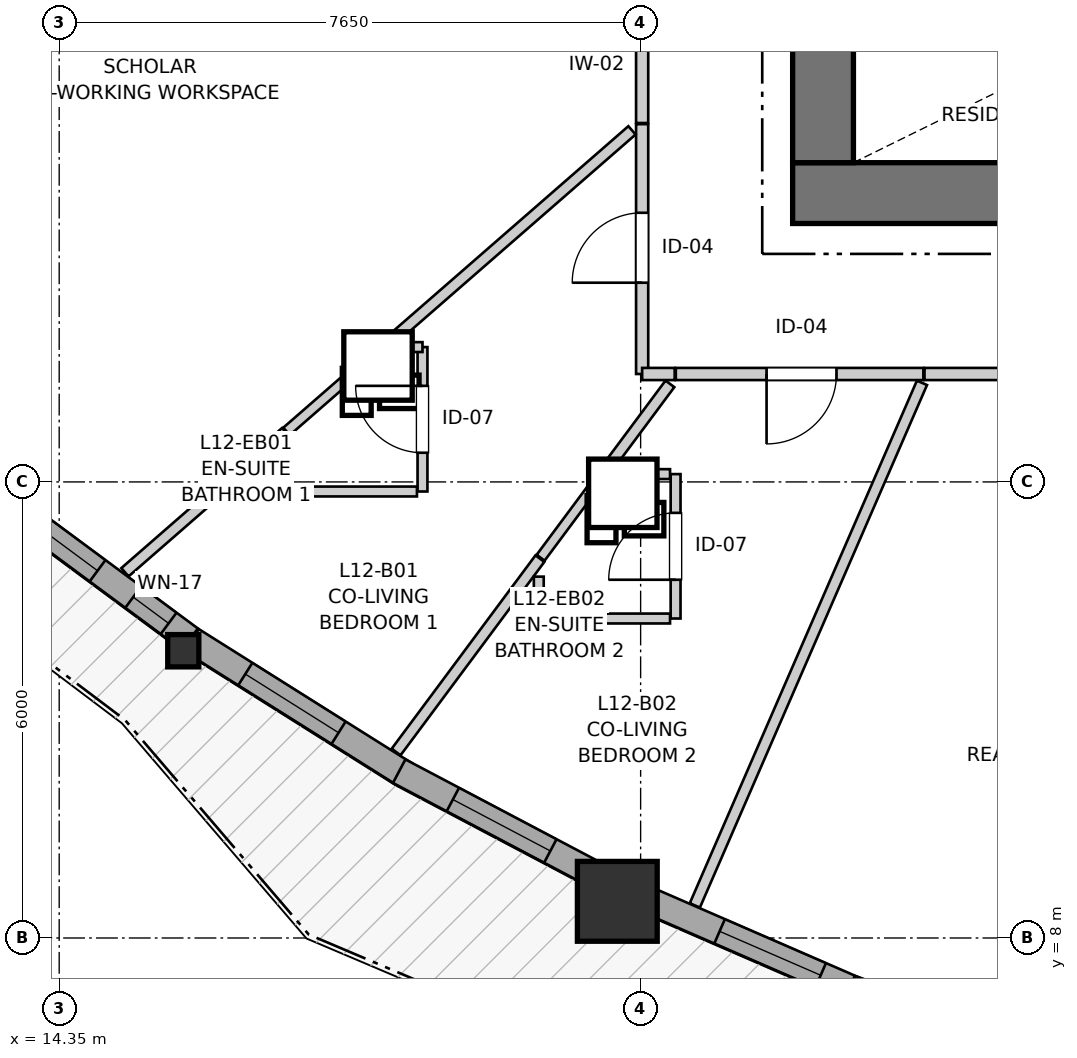
"""IFC4 building model, lengths in metres.
Left out: names, types, materials, properties, quantities, classifications, styles, units other than length and angle.
Written with IfcOpenShell. Run it as: python <this file> out.ifc"""

import sys

from ifc_helpers import new_model, si_unit, direction, frame, frame_2d, origin, origin_2d, place, context, subcontext, project, spatial, rectangle, i_section, extrude, source, transform, mapped, element, fill, save


model = new_model("IFC4")
c1 = context("Model", 3, precision=1e-05, world=origin(), true_north=direction((0.0, 1.0)))
c2 = subcontext(c1, "Body", "Model", "MODEL_VIEW")
j1 = project(units=[si_unit("LENGTHUNIT", "METRE"), si_unit("PLANEANGLEUNIT", "RADIAN")], contexts=[c1])
p1 = place(None, origin())
s1 = spatial("IfcSite", under=j1, at=p1, CompositionType="ELEMENT")
p2 = place(p1, origin())
s2 = spatial("IfcBuilding", under=s1, at=p2, CompositionType="ELEMENT")
p3 = place(p2, frame((0.0, 0.0, 43.0)))
s3 = spatial("IfcBuildingStorey", under=s2, at=p3, CompositionType="ELEMENT", Elevation=43.0)
p4 = place(p3, frame((24.0, 17.8, 0.0), z_axis=(0.0, 0.0, 1.0), x_axis=(1.0, 0.0, 0.0)))
e1 = element("IfcWall", 1, at=p4, inside=s3, PredefinedType="SHEAR", context=c2, shape_type="SweptSolid", body=[
    extrude(rectangle(XDim=12.7, YDim=0.8, at=frame_2d((6.35, 0.0))), origin(), (0.0, 0.0, 1.0), 2.94),
])
p5 = place(p3, frame((24.4, 33.8, 0.0), z_axis=(0.0, 0.0, 1.0), x_axis=(0.0, -1.0, 0.0)))
e2 = element("IfcWall", 2, at=p5, inside=s3, PredefinedType="SHEAR", context=c2, shape_type="SweptSolid", body=[
    extrude(rectangle(XDim=15.6, YDim=0.8, at=frame_2d((7.8, 0.0))), origin(), (0.0, 0.0, 1.0), 2.94),
])
p6 = place(p5, frame((7.05, 0.0, 0.0)))
e3 = element("IfcOpeningElement", 3, at=p6, cuts=e2, PredefinedType="OPENING", context=c2, shape_type="SweptSolid", body=[
    extrude(rectangle(XDim=1.5, YDim=2.15, at=frame_2d((0.75, 1.075))), frame((0.0, 0.41, 0.0), z_axis=(0.0, -1.0, 0.0), x_axis=(1.0, 0.0, 0.0)), (0.0, 0.0, 1.0), 0.82),
])
p7 = place(p5, frame((3.52, 0.0, 0.0)))
e4 = element("IfcOpeningElement", 4, at=p7, cuts=e2, PredefinedType="OPENING", context=c2, shape_type="SweptSolid", body=[
    extrude(rectangle(XDim=0.86, YDim=2.05, at=frame_2d((0.43, 1.025))), frame((0.0, 0.41, 0.0), z_axis=(0.0, -1.0, 0.0), x_axis=(1.0, 0.0, 0.0)), (0.0, 0.0, 1.0), 0.82),
])
p8 = place(p5, frame((11.22, 0.0, 0.0)))
e5 = element("IfcOpeningElement", 5, at=p8, cuts=e2, PredefinedType="OPENING", context=c2, shape_type="SweptSolid", body=[
    extrude(rectangle(XDim=0.86, YDim=2.05, at=frame_2d((0.43, 1.025))), frame((0.0, 0.41, 0.0), z_axis=(0.0, -1.0, 0.0), x_axis=(1.0, 0.0, 0.0)), (0.0, 0.0, 1.0), 0.82),
])
m1 = source(origin(), c2, "Body", "SweptSolid", [
    extrude(i_section(OverallWidth=0.409, OverallDepth=0.425, WebThickness=0.03, FlangeThickness=0.048, FilletRadius=0.015, at=origin_2d()), origin(), (0.0, 0.0, 1.0), 2.94),
])
p9 = place(p3, frame((15.983, 11.779, 0.0), z_axis=(0.0, 0.0, 1.0), x_axis=(1.0, 0.0, 0.0)))
e6 = element("IfcColumn", 6, at=p9, inside=s3, PredefinedType="PILASTER", context=c2, shape_type="MappedRepresentation", body=[
    mapped(m1, transform((0.0, 0.0, 0.0), x_axis=(1.0, 0.0, 0.0), y_axis=(0.0, 1.0, 0.0), z_axis=(0.0, 0.0, 1.0), scale=1.0)),
])
m2 = source(origin(), c2, "Body", "SweptSolid", [
    extrude(rectangle(XDim=1.05, YDim=1.05, at=origin_2d()), origin(), (0.0, 0.0, 1.0), 2.94),
])
p10 = place(p3, frame((21.693, 8.482, 0.0), z_axis=(0.0, 0.0, 1.0), x_axis=(1.0, 0.0, 0.0)))
e7 = element("IfcColumn", 7, at=p10, inside=s3, PredefinedType="COLUMN", context=c2, shape_type="MappedRepresentation", body=[
    mapped(m2, transform((0.0, 0.0, 0.0), x_axis=(1.0, 0.0, 0.0), y_axis=(0.0, 1.0, 0.0), z_axis=(0.0, 0.0, 1.0), scale=1.0)),
])
p11 = place(p3, frame((13.389, 13.917, 0.0), z_axis=(0.0, 0.0, 1.0), x_axis=(0.803777512245, -0.594930004966, 0.0)))
e8 = element("IfcWall", 8, at=p11, inside=s3, PredefinedType="SOLIDWALL", context=c2, shape_type="SweptSolid", body=[
    extrude(rectangle(XDim=3.336, YDim=0.35, at=frame_2d((1.668, 0.0))), origin(), (0.0, 0.0, 1.0), 2.42),
])
p12 = place(p11, frame((0.374, 0.0, 0.82)))
e9 = element("IfcOpeningElement", 9, at=p12, cuts=e8, PredefinedType="OPENING", context=c2, shape_type="SweptSolid", body=[
    extrude(rectangle(XDim=1.45, YDim=1.25, at=frame_2d((0.725, 0.625))), frame((0.0, 0.185, 0.0), z_axis=(0.0, -1.0, 0.0), x_axis=(1.0, 0.0, 0.0)), (0.0, 0.0, 1.0), 0.37),
])
p13 = place(p11, frame((2.407, 0.0, 0.82)))
e10 = element("IfcOpeningElement", 10, at=p13, cuts=e8, PredefinedType="OPENING", context=c2, shape_type="SweptSolid", body=[
    extrude(rectangle(XDim=0.58, YDim=1.35, at=frame_2d((0.29, 0.675))), frame((0.0, 0.185, 0.0), z_axis=(0.0, -1.0, 0.0), x_axis=(1.0, 0.0, 0.0)), (0.0, 0.0, 1.0), 0.37),
])
p14 = place(p3, frame((16.093, 11.917, 0.0), z_axis=(0.0, 0.0, 1.0), x_axis=(0.846444167315, -0.532477484612, 0.0)))
e11 = element("IfcWall", 11, at=p14, inside=s3, PredefinedType="SOLIDWALL", context=c2, shape_type="SweptSolid", body=[
    extrude(rectangle(XDim=3.317, YDim=0.35, at=frame_2d((1.659, 0.0))), origin(), (0.0, 0.0, 1.0), 2.42),
])
p15 = place(p14, frame((0.834, 0.0, 0.82)))
e12 = element("IfcOpeningElement", 12, at=p15, cuts=e11, PredefinedType="OPENING", context=c2, shape_type="SweptSolid", body=[
    extrude(rectangle(XDim=1.45, YDim=1.25, at=frame_2d((0.725, 0.625))), frame((0.0, 0.185, 0.0), z_axis=(0.0, -1.0, 0.0), x_axis=(1.0, 0.0, 0.0)), (0.0, 0.0, 1.0), 0.37),
])
p16 = place(p3, frame((18.823, 10.195, 0.0), z_axis=(0.0, 0.0, 1.0), x_axis=(0.884422538795, -0.466687018108, 0.0)))
e13 = element("IfcWall", 13, at=p16, inside=s3, PredefinedType="SOLIDWALL", context=c2, shape_type="SweptSolid", body=[
    extrude(rectangle(XDim=3.037, YDim=0.35, at=frame_2d((1.519, 0.0))), origin(), (0.0, 0.0, 1.0), 2.42),
])
p17 = place(p16, frame((0.799, 0.0, 0.82)))
e14 = element("IfcOpeningElement", 14, at=p17, cuts=e13, PredefinedType="OPENING", context=c2, shape_type="SweptSolid", body=[
    extrude(rectangle(XDim=1.45, YDim=1.25, at=frame_2d((0.725, 0.625))), frame((0.0, 0.185, 0.0), z_axis=(0.0, -1.0, 0.0), x_axis=(1.0, 0.0, 0.0)), (0.0, 0.0, 1.0), 0.37),
])
p18 = place(p3, frame((22.038, 8.523, 0.0), z_axis=(0.0, 0.0, 1.0), x_axis=(0.91704973522, -0.398772846535, 0.0)))
e15 = element("IfcWall", 15, at=p18, inside=s3, PredefinedType="SOLIDWALL", context=c2, shape_type="SweptSolid", body=[
    extrude(rectangle(XDim=3.056, YDim=0.35, at=frame_2d((1.528, 0.0))), origin(), (0.0, 0.0, 1.0), 2.42),
])
p19 = place(p18, frame((1.092, 0.0, 0.82)))
e16 = element("IfcOpeningElement", 16, at=p19, cuts=e15, PredefinedType="OPENING", context=c2, shape_type="SweptSolid", body=[
    extrude(rectangle(XDim=1.45, YDim=1.25, at=frame_2d((0.725, 0.625))), frame((0.0, 0.185, 0.0), z_axis=(0.0, -1.0, 0.0), x_axis=(1.0, 0.0, 0.0)), (0.0, 0.0, 1.0), 0.37),
])
p20 = place(p3, frame((24.758, 7.337, 0.0), z_axis=(0.0, 0.0, 1.0), x_axis=(0.944146789085, -0.329525174547, 0.0)))
e17 = element("IfcWall", 17, at=p20, inside=s3, PredefinedType="SOLIDWALL", context=c2, shape_type="SweptSolid", body=[
    extrude(rectangle(XDim=3.374, YDim=0.35, at=frame_2d((1.687, 0.0))), origin(), (0.0, 0.0, 1.0), 2.42),
])
p21 = place(p20, frame((0.647, 0.0, 0.82)))
e18 = element("IfcOpeningElement", 18, at=p21, cuts=e17, PredefinedType="OPENING", context=c2, shape_type="SweptSolid", body=[
    extrude(rectangle(XDim=2.1, YDim=1.4, at=frame_2d((1.05, 0.7))), frame((0.0, 0.185, 0.0), z_axis=(0.0, -1.0, 0.0), x_axis=(1.0, 0.0, 0.0)), (0.0, 0.0, 1.0), 0.37),
])
p22 = place(p3, frame((22.02, 18.722, 0.0), z_axis=(0.0, 0.0, 1.0), x_axis=(0.0, 1.0, 0.0)))
e19 = element("IfcWall", 19, at=p22, inside=s3, PredefinedType="PARTITIONING", context=c2, shape_type="SweptSolid", body=[
    extrude(rectangle(XDim=5.428, YDim=0.16, at=frame_2d((2.714, 0.0))), origin(), (0.0, 0.0, 1.0), 2.94),
])
p23 = place(p22, frame((1.996, 0.0, 0.0)))
e20 = element("IfcOpeningElement", 20, at=p23, cuts=e19, PredefinedType="OPENING", context=c2, shape_type="SweptSolid", body=[
    extrude(rectangle(XDim=0.96, YDim=2.1, at=frame_2d((0.48, 1.05))), frame((0.0, 0.09, 0.0), z_axis=(0.0, -1.0, 0.0), x_axis=(1.0, 0.0, 0.0)), (0.0, 0.0, 1.0), 0.18),
])
p24 = place(p3, frame((30.849, 15.42, 0.0), z_axis=(0.0, 0.0, 1.0), x_axis=(-1.0, 0.0, 0.0)))
e21 = element("IfcWall", 21, at=p24, inside=s3, PredefinedType="PARTITIONING", context=c2, shape_type="SweptSolid", body=[
    extrude(rectangle(XDim=5.114, YDim=0.16, at=frame_2d((2.557, 0.0))), origin(), (0.0, 0.0, 1.0), 2.94),
])
p25 = place(p24, frame((2.076, 0.0, 0.0)))
e22 = element("IfcOpeningElement", 22, at=p25, cuts=e21, PredefinedType="OPENING", context=c2, shape_type="SweptSolid", body=[
    extrude(rectangle(XDim=0.96, YDim=2.1, at=frame_2d((0.48, 1.05))), frame((0.0, 0.09, 0.0), z_axis=(0.0, -1.0, 0.0), x_axis=(1.0, 0.0, 0.0)), (0.0, 0.0, 1.0), 0.18),
])
p26 = place(p3, frame((22.02, 15.42, 0.0), z_axis=(0.0, 0.0, 1.0), x_axis=(0.0, 1.0, 0.0)))
e23 = element("IfcWall", 23, at=p26, inside=s3, PredefinedType="PARTITIONING", context=c2, shape_type="SweptSolid", body=[
    extrude(rectangle(XDim=3.287, YDim=0.16, at=frame_2d((1.644, 0.0))), origin(), (0.0, 0.0, 1.0), 2.94),
])
p27 = place(p26, frame((1.201, 0.0, 0.0)))
e24 = element("IfcOpeningElement", 24, at=p27, cuts=e23, PredefinedType="OPENING", context=c2, shape_type="SweptSolid", body=[
    extrude(rectangle(XDim=0.92, YDim=2.1, at=frame_2d((0.46, 1.05))), frame((0.0, 0.09, 0.0), z_axis=(0.0, -1.0, 0.0), x_axis=(1.0, 0.0, 0.0)), (0.0, 0.0, 1.0), 0.18),
])
p28 = place(p3, frame((25.72, 15.42, 0.0), z_axis=(0.0, 0.0, 1.0), x_axis=(-1.0, 0.0, 0.0)))
e25 = element("IfcWall", 25, at=p28, inside=s3, PredefinedType="PARTITIONING", context=c2, shape_type="SweptSolid", body=[
    extrude(rectangle(XDim=3.257, YDim=0.16, at=frame_2d((1.628, 0.0))), origin(), (0.0, 0.0, 1.0), 2.94),
])
p29 = place(p28, frame((1.143, 0.0, 0.0)))
e26 = element("IfcOpeningElement", 26, at=p29, cuts=e25, PredefinedType="OPENING", context=c2, shape_type="SweptSolid", body=[
    extrude(rectangle(XDim=0.92, YDim=2.1, at=frame_2d((0.46, 1.05))), frame((0.0, 0.09, 0.0), z_axis=(0.0, -1.0, 0.0), x_axis=(1.0, 0.0, 0.0)), (0.0, 0.0, 1.0), 0.18),
])
p30 = place(p3, frame((22.46, 12.203, 0.0), z_axis=(0.0, 0.0, 1.0), x_axis=(0.0, 1.0, 0.0)))
e27 = element("IfcWall", 27, at=p30, inside=s3, PredefinedType="PARTITIONING", context=c2, shape_type="SweptSolid", body=[
    extrude(rectangle(XDim=1.9, YDim=0.13, at=frame_2d((0.95, 0.0))), origin(), (0.0, 0.0, 1.0), 2.94),
])
p31 = place(p30, frame((0.51, 0.0, 0.0)))
e28 = element("IfcOpeningElement", 28, at=p31, cuts=e27, PredefinedType="OPENING", context=c2, shape_type="SweptSolid", body=[
    extrude(rectangle(XDim=0.88, YDim=2.05, at=frame_2d((0.44, 1.025))), frame((0.0, 0.075, 0.0), z_axis=(0.0, -1.0, 0.0), x_axis=(1.0, 0.0, 0.0)), (0.0, 0.0, 1.0), 0.15),
])
p32 = place(p3, frame((19.13, 13.874, 0.0), z_axis=(0.0, 0.0, 1.0), x_axis=(0.0, 1.0, 0.0)))
e29 = element("IfcWall", 29, at=p32, inside=s3, PredefinedType="PARTITIONING", context=c2, shape_type="SweptSolid", body=[
    extrude(rectangle(XDim=1.9, YDim=0.13, at=frame_2d((0.95, 0.0))), origin(), (0.0, 0.0, 1.0), 2.94),
])
p33 = place(p32, frame((0.51, 0.0, 0.0)))
e30 = element("IfcOpeningElement", 30, at=p33, cuts=e29, PredefinedType="OPENING", context=c2, shape_type="SweptSolid", body=[
    extrude(rectangle(XDim=0.88, YDim=2.05, at=frame_2d((0.44, 1.025))), frame((0.0, 0.075, 0.0), z_axis=(0.0, -1.0, 0.0), x_axis=(1.0, 0.0, 0.0)), (0.0, 0.0, 1.0), 0.15),
])
p34 = place(p3, frame((22.713, 8.429, 0.0), z_axis=(0.0, 0.0, 1.0), x_axis=(0.398615352261, 0.917118204454, 0.0)))
e31 = element("IfcWall", 31, at=p34, inside=s3, PredefinedType="PARTITIONING", context=c2, shape_type="SweptSolid", body=[
    extrude(rectangle(XDim=7.496, YDim=0.145, at=frame_2d((3.748, 0.0))), origin(), (0.0, 0.0, 1.0), 2.94),
])
p35 = place(p3, frame((18.614, 15.774, 0.0), z_axis=(0.0, 0.0, 1.0), x_axis=(0.753902736672, 0.656986045239, 0.0)))
e32 = element("IfcWall", 32, at=p35, inside=s3, PredefinedType="PARTITIONING", context=c2, shape_type="SweptSolid", body=[
    extrude(rectangle(XDim=4.34, YDim=0.145, at=frame_2d((2.17, 0.0))), origin(), (0.0, 0.0, 1.0), 2.94),
])
p36 = place(p3, frame((18.783, 10.447, 0.0), z_axis=(0.0, 0.0, 1.0), x_axis=(0.596791765516, 0.80239615441, 0.0)))
e33 = element("IfcWall", 33, at=p36, inside=s3, PredefinedType="PARTITIONING", context=c2, shape_type="SweptSolid", body=[
    extrude(rectangle(XDim=3.17, YDim=0.145, at=frame_2d((1.585, 0.0))), origin(), (0.0, 0.0, 1.0), 2.94),
])
p37 = place(p3, frame((15.215, 12.812, 0.0), z_axis=(0.0, 0.0, 1.0), x_axis=(0.753874404049, 0.657018555993, 0.0)))
e34 = element("IfcWall", 34, at=p37, inside=s3, PredefinedType="PARTITIONING", context=c2, shape_type="SweptSolid", body=[
    extrude(rectangle(XDim=2.805, YDim=0.145, at=frame_2d((1.403, 0.0))), origin(), (0.0, 0.0, 1.0), 2.94),
])
p38 = place(p3, frame((17.33, 13.874, 0.0), z_axis=(0.0, 0.0, 1.0), x_axis=(1.0, 0.0, 0.0)))
e35 = element("IfcWall", 35, at=p38, inside=s3, PredefinedType="PARTITIONING", context=c2, shape_type="SweptSolid", body=[
    extrude(rectangle(XDim=1.727, YDim=0.13, at=frame_2d((0.863, 0.0))), origin(), (0.0, 0.0, 1.0), 2.94),
])
p39 = place(p3, frame((20.66, 12.203, 0.0), z_axis=(0.0, 0.0, 1.0), x_axis=(1.0, 0.0, 0.0)))
e36 = element("IfcWall", 36, at=p39, inside=s3, PredefinedType="PARTITIONING", context=c2, shape_type="SweptSolid", body=[
    extrude(rectangle(XDim=1.727, YDim=0.13, at=frame_2d((0.864, 0.0))), origin(), (0.0, 0.0, 1.0), 2.94),
])
p40 = place(p3, frame((17.341, 14.665, 0.0), z_axis=(0.0, 0.0, 1.0), x_axis=(0.753885757535, 0.657005528581, 0.0)))
e37 = element("IfcWall", 37, at=p40, inside=s3, PredefinedType="PARTITIONING", context=c2, shape_type="SweptSolid", body=[
    extrude(rectangle(XDim=1.673, YDim=0.13, at=frame_2d((0.837, 0.0))), origin(), (0.0, 0.0, 1.0), 2.94),
])
p41 = place(p3, frame((21.491, 14.088, 0.0), z_axis=(0.0, 0.0, 1.0), x_axis=(0.596893728005, 0.802320308523, 0.0)))
e38 = element("IfcWall", 38, at=p41, inside=s3, PredefinedType="PARTITIONING", context=c2, shape_type="SweptSolid", body=[
    extrude(rectangle(XDim=1.499, YDim=0.145, at=frame_2d((0.749, 0.0))), origin(), (0.0, 0.0, 1.0), 2.94),
])
p42 = place(p3, frame((20.684, 13.003, 0.0), z_axis=(0.0, 0.0, 1.0), x_axis=(0.596518903615, 0.802599026681, 0.0)))
e39 = element("IfcWall", 39, at=p42, inside=s3, PredefinedType="PARTITIONING", context=c2, shape_type="SweptSolid", body=[
    extrude(rectangle(XDim=1.337, YDim=0.13, at=frame_2d((0.669, 0.0))), origin(), (0.0, 0.0, 1.0), 2.94),
])
p43 = place(p3, frame((21.649, 14.103, 0.0), z_axis=(0.0, 0.0, 1.0), x_axis=(1.0, 0.0, 0.0)))
e40 = element("IfcWall", 40, at=p43, inside=s3, PredefinedType="PARTITIONING", context=c2, shape_type="SweptSolid", body=[
    extrude(rectangle(XDim=0.738, YDim=0.13, at=frame_2d((0.369, 0.0))), origin(), (0.0, 0.0, 1.0), 2.94),
])
p44 = place(p3, frame((17.33, 13.947, 0.0), z_axis=(0.0, 0.0, 1.0), x_axis=(0.0, 1.0, 0.0)))
e41 = element("IfcWall", 41, at=p44, inside=s3, PredefinedType="PARTITIONING", context=c2, shape_type="SweptSolid", body=[
    extrude(rectangle(XDim=0.547, YDim=0.13, at=frame_2d((0.273, 0.0))), origin(), (0.0, 0.0, 1.0), 2.94),
])
p45 = place(p3, frame((20.66, 12.276, 0.0), z_axis=(0.0, 0.0, 1.0), x_axis=(0.0, 1.0, 0.0)))
e42 = element("IfcWall", 42, at=p45, inside=s3, PredefinedType="PARTITIONING", context=c2, shape_type="SweptSolid", body=[
    extrude(rectangle(XDim=0.478, YDim=0.13, at=frame_2d((0.239, 0.0))), origin(), (0.0, 0.0, 1.0), 2.94),
])
p46 = place(p3, frame((18.749, 15.774, 0.0), z_axis=(0.0, 0.0, 1.0), x_axis=(1.0, 0.0, 0.0)))
e43 = element("IfcWall", 43, at=p46, inside=s3, PredefinedType="PARTITIONING", context=c2, shape_type="SweptSolid", body=[
    extrude(rectangle(XDim=0.381, YDim=0.13, at=frame_2d((0.19, 0.0))), origin(), (0.0, 0.0, 1.0), 2.94),
])
p47 = place(p3, frame((22.02, 15.42, 0.0), z_axis=(0.0, 0.0, 1.0), x_axis=(1.0, 0.0, 0.0)))
e44 = element("IfcWall", 44, at=p47, inside=s3, PredefinedType="PARTITIONING", context=c2, shape_type="SweptSolid", body=[
    extrude(rectangle(XDim=0.428, YDim=0.16, at=frame_2d((0.214, 0.0))), origin(), (0.0, 0.0, 1.0), 2.94),
])
m3 = source(origin(), c2, "Body", "SweptSolid", [
    extrude(rectangle(XDim=1.45, YDim=1.25, at=frame_2d((0.725, 0.625))), frame((0.0, 0.03, 0.0), z_axis=(0.0, -1.0, 0.0), x_axis=(1.0, 0.0, 0.0)), (0.0, 0.0, 1.0), 0.06),
])
p48 = place(p12, origin())
e45 = element("IfcWindow", 45, at=p48, inside=s3, PartitioningType="SINGLE_PANEL", PredefinedType="WINDOW", context=c2, shape_type="MappedRepresentation", body=[
    mapped(m3, transform((0.0, 0.0, 0.0), x_axis=(1.0, 0.0, 0.0), y_axis=(0.0, 1.0, 0.0), z_axis=(0.0, 0.0, 1.0), scale=1.0)),
])
fill(e9, e45)
m4 = source(origin(), c2, "Body", "SweptSolid", [
    extrude(rectangle(XDim=0.58, YDim=1.35, at=frame_2d((0.29, 0.675))), frame((0.0, 0.03, 0.0), z_axis=(0.0, -1.0, 0.0), x_axis=(1.0, 0.0, 0.0)), (0.0, 0.0, 1.0), 0.06),
])
p49 = place(p13, origin())
e46 = element("IfcWindow", 46, at=p49, inside=s3, PartitioningType="SINGLE_PANEL", PredefinedType="WINDOW", context=c2, shape_type="MappedRepresentation", body=[
    mapped(m4, transform((0.0, 0.0, 0.0), x_axis=(1.0, 0.0, 0.0), y_axis=(0.0, 1.0, 0.0), z_axis=(0.0, 0.0, 1.0), scale=1.0)),
])
fill(e10, e46)
p50 = place(p15, origin())
e47 = element("IfcWindow", 47, at=p50, inside=s3, PartitioningType="SINGLE_PANEL", PredefinedType="WINDOW", context=c2, shape_type="MappedRepresentation", body=[
    mapped(m3, transform((0.0, 0.0, 0.0), x_axis=(1.0, 0.0, 0.0), y_axis=(0.0, 1.0, 0.0), z_axis=(0.0, 0.0, 1.0), scale=1.0)),
])
fill(e12, e47)
p51 = place(p17, origin())
e48 = element("IfcWindow", 48, at=p51, inside=s3, PartitioningType="SINGLE_PANEL", PredefinedType="WINDOW", context=c2, shape_type="MappedRepresentation", body=[
    mapped(m3, transform((0.0, 0.0, 0.0), x_axis=(1.0, 0.0, 0.0), y_axis=(0.0, 1.0, 0.0), z_axis=(0.0, 0.0, 1.0), scale=1.0)),
])
fill(e14, e48)
p52 = place(p19, origin())
e49 = element("IfcWindow", 49, at=p52, inside=s3, PartitioningType="SINGLE_PANEL", PredefinedType="WINDOW", context=c2, shape_type="MappedRepresentation", body=[
    mapped(m3, transform((0.0, 0.0, 0.0), x_axis=(1.0, 0.0, 0.0), y_axis=(0.0, 1.0, 0.0), z_axis=(0.0, 0.0, 1.0), scale=1.0)),
])
fill(e16, e49)
m5 = source(origin(), c2, "Body", "SweptSolid", [
    extrude(rectangle(XDim=0.92, YDim=2.1, at=frame_2d((0.46, 1.05))), frame((0.0, 0.025, 0.0), z_axis=(0.0, -1.0, 0.0), x_axis=(1.0, 0.0, 0.0)), (0.0, 0.0, 1.0), 0.05),
])
p53 = place(p27, origin())
e50 = element("IfcDoor", 50, at=p53, inside=s3, OperationType="SINGLE_SWING_LEFT", PredefinedType="DOOR", context=c2, shape_type="MappedRepresentation", body=[
    mapped(m5, transform((0.0, 0.0, 0.0), x_axis=(1.0, 0.0, 0.0), y_axis=(0.0, 1.0, 0.0), z_axis=(0.0, 0.0, 1.0), scale=1.0)),
])
fill(e24, e50)
p54 = place(p29, origin())
e51 = element("IfcDoor", 51, at=p54, inside=s3, OperationType="SINGLE_SWING_RIGHT", PredefinedType="DOOR", context=c2, shape_type="MappedRepresentation", body=[
    mapped(m5, transform((0.0, 0.0, 0.0), x_axis=(1.0, 0.0, 0.0), y_axis=(0.0, 1.0, 0.0), z_axis=(0.0, 0.0, 1.0), scale=1.0)),
])
fill(e26, e51)
m6 = source(origin(), c2, "Body", "SweptSolid", [
    extrude(rectangle(XDim=0.88, YDim=2.05, at=frame_2d((0.44, 1.025))), frame((0.0, 0.025, 0.0), z_axis=(0.0, -1.0, 0.0), x_axis=(1.0, 0.0, 0.0)), (0.0, 0.0, 1.0), 0.05),
])
p55 = place(p31, origin())
e52 = element("IfcDoor", 52, at=p55, inside=s3, OperationType="SINGLE_SWING_LEFT", PredefinedType="DOOR", context=c2, shape_type="MappedRepresentation", body=[
    mapped(m6, transform((0.0, 0.0, 0.0), x_axis=(1.0, 0.0, 0.0), y_axis=(0.0, 1.0, 0.0), z_axis=(0.0, 0.0, 1.0), scale=1.0)),
])
fill(e28, e52)
p56 = place(p33, origin())
e53 = element("IfcDoor", 53, at=p56, inside=s3, OperationType="SINGLE_SWING_RIGHT", PredefinedType="DOOR", context=c2, shape_type="MappedRepresentation", body=[
    mapped(m6, transform((0.0, 0.0, 0.0), x_axis=(1.0, 0.0, 0.0), y_axis=(0.0, 1.0, 0.0), z_axis=(0.0, 0.0, 1.0), scale=1.0)),
])
fill(e30, e53)
save(model, sys.argv[1])
